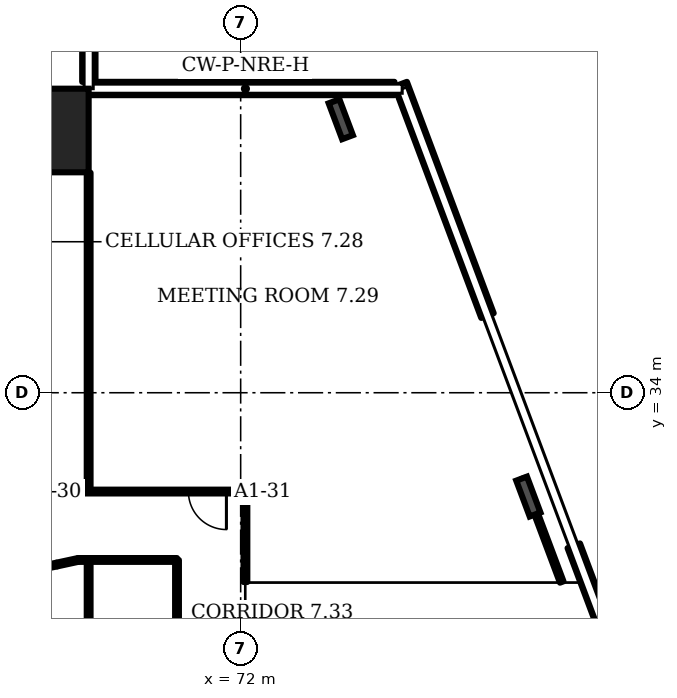
"""IFC4 building model, lengths in metres.
Left out: names, types, materials, properties, quantities, classifications, styles, units other than length and angle.
Written with IfcOpenShell. Run it as: python <this file> out.ifc"""

import sys

from ifc_helpers import new_model, si_unit, direction, frame, frame_2d, origin, origin_2d, place, context, subcontext, project, spatial, rectangle, i_section, extrude, element, fill, save


model = new_model("IFC4")
c1 = context("Model", 3, precision=1e-05, world=origin(), true_north=direction((0.0, 1.0)))
c2 = subcontext(c1, "Body", "Model", "MODEL_VIEW")
j1 = project(units=[si_unit("LENGTHUNIT", "METRE"), si_unit("PLANEANGLEUNIT", "RADIAN")], contexts=[c1])
p1 = place(None, origin())
s1 = spatial("IfcSite", under=j1, at=p1, CompositionType="ELEMENT")
p2 = place(p1, origin())
s2 = spatial("IfcBuilding", under=s1, at=p2, CompositionType="ELEMENT")
p3 = place(p2, frame((0.0, 0.0, 45.1)))
s3 = spatial("IfcBuildingStorey", under=s2, at=p3, CompositionType="ELEMENT", Elevation=45.1)
p4 = place(p3, frame((66.9, 40.9, 0.0), z_axis=(0.0, 0.0, 1.0), x_axis=(1.0, 0.0, 0.0)))
e1 = element("IfcColumn", 1, at=p4, inside=s3, PredefinedType="COLUMN", context=c2, shape_type="SweptSolid", body=[
    extrude(rectangle(XDim=2.2, YDim=2.2, at=origin_2d()), origin(), (0.0, 0.0, 1.0), 3.6),
])
for number, where, z_axis, x_axis in (
    (2, (79.57, 31.268, 0.0), (0.0, 0.0, 1.0), (0.936, 0.351, 0.0)),
    (3, (74.634, 41.196, 0.0), (0.0, 0.0, 1.0), (0.936, 0.351, 0.0)),
):
    element("IfcColumn", number, at=place(p3, frame(where, z_axis=z_axis, x_axis=x_axis)), inside=s3, PredefinedType="COLUMN", context=c2, shape_type="SweptSolid", body=[
        extrude(i_section(OverallWidth=0.302, OverallDepth=1.008, WebThickness=0.021, FlangeThickness=0.04, FilletRadius=0.03, at=origin_2d()), origin(), (0.0, 0.0, 1.0), 3.6),
    ])
p5 = place(p3, frame((82.994, 24.03, 0.0), z_axis=(0.0, 0.0, 1.0), x_axis=(-0.351133, 0.936329, 0.0)))
e4 = element("IfcWall", 4, at=p5, inside=s3, PredefinedType="SOLIDWALL", context=c2, shape_type="SweptSolid", body=[
    extrude(rectangle(XDim=6.348, YDim=0.35, at=frame_2d((3.174, 0.0))), origin(), (0.0, 0.0, 1.0), 1.0),
])
p6 = place(p3, frame((78.494, 36.03, 0.0), z_axis=(0.0, 0.0, 1.0), x_axis=(-0.351108, 0.936338, 0.0)))
e5 = element("IfcWall", 5, at=p6, inside=s3, PredefinedType="SOLIDWALL", context=c2, shape_type="SweptSolid", body=[
    extrude(rectangle(XDim=6.503, YDim=0.35, at=frame_2d((3.251, 0.0))), origin(), (0.0, 0.0, 1.0), 1.0),
])
p7 = place(p3, frame((76.047, 42.005, 0.0), z_axis=(0.0, 0.0, 1.0), x_axis=(-1.0, 0.0, 0.0)))
e6 = element("IfcWall", 6, at=p7, inside=s3, PredefinedType="SOLIDWALL", context=c2, shape_type="SweptSolid", body=[
    extrude(rectangle(XDim=8.047, YDim=0.35, at=frame_2d((4.023, 0.0))), origin(), (0.0, 0.0, 1.0), 1.0),
])
p8 = place(p3, frame((68.005, 42.18, 0.0), z_axis=(0.0, 0.0, 1.0), x_axis=(0.0, 1.0, 0.0)))
e7 = element("IfcWall", 7, at=p8, inside=s3, PredefinedType="SOLIDWALL", context=c2, shape_type="SweptSolid", body=[
    extrude(rectangle(XDim=5.947, YDim=0.35, at=frame_2d((2.973, 0.0))), origin(), (0.0, 0.0, 1.0), 1.0),
])
p9 = place(p3, frame((65.0, 31.4, 0.0), z_axis=(0.0, 0.0, 1.0), x_axis=(1.0, 0.0, 0.0)))
e8 = element("IfcWall", 8, at=p9, inside=s3, PredefinedType="PARTITIONING", context=c2, shape_type="SweptSolid", body=[
    extrude(rectangle(XDim=7.125, YDim=0.1, at=frame_2d((3.562, 0.0))), origin(), (0.0, 0.0, 1.0), 3.2),
])
p10 = place(p9, frame((0.1, 0.0, 0.0)))
e9 = element("IfcOpeningElement", 9, at=p10, cuts=e8, PredefinedType="OPENING", context=c2, shape_type="SweptSolid", body=[
    extrude(rectangle(XDim=1.0, YDim=2.1, at=frame_2d((0.5, 1.05))), frame((0.0, 0.06, 0.0), z_axis=(0.0, -1.0, 0.0), x_axis=(1.0, 0.0, 0.0)), (0.0, 0.0, 1.0), 0.12),
])
p11 = place(p9, frame((5.625, 0.0, 0.0)))
e10 = element("IfcOpeningElement", 10, at=p11, cuts=e8, PredefinedType="OPENING", context=c2, shape_type="SweptSolid", body=[
    extrude(rectangle(XDim=1.0, YDim=2.1, at=frame_2d((0.5, 1.05))), frame((0.0, 0.06, 0.0), z_axis=(0.0, -1.0, 0.0), x_axis=(1.0, 0.0, 0.0)), (0.0, 0.0, 1.0), 0.12),
])
p12 = place(p3, frame((66.78, 29.4, 0.0), z_axis=(0.0, 0.0, 1.0), x_axis=(0.979048, 0.203632, 0.0)))
e11 = element("IfcWall", 11, at=p12, inside=s3, PredefinedType="PARTITIONING", context=c2, shape_type="SweptSolid", body=[
    extrude(rectangle(XDim=0.393, YDim=0.1, at=frame_2d((0.197, 0.0))), origin(), (0.0, 0.0, 1.0), 3.2),
])
p13 = place(p3, frame((67.165, 29.48, 0.0), z_axis=(0.0, 0.0, 1.0), x_axis=(0.977367, 0.211555, 0.0)))
e12 = element("IfcWall", 12, at=p13, inside=s3, PredefinedType="PARTITIONING", context=c2, shape_type="SweptSolid", body=[
    extrude(rectangle(XDim=0.568, YDim=0.1, at=frame_2d((0.284, 0.0))), origin(), (0.0, 0.0, 1.0), 3.2),
])
p14 = place(p3, frame((67.72, 29.6, 0.0), z_axis=(0.0, 0.0, 1.0), x_axis=(1.0, 0.0, 0.0)))
e13 = element("IfcWall", 13, at=p14, inside=s3, PredefinedType="PARTITIONING", context=c2, shape_type="SweptSolid", body=[
    extrude(rectangle(XDim=2.605, YDim=0.1, at=frame_2d((1.302, 0.0))), origin(), (0.0, 0.0, 1.0), 3.2),
])
p15 = place(p3, frame((68.0, 14.24, 0.0), z_axis=(0.0, 0.0, 1.0), x_axis=(0.0, 1.0, 0.0)))
e14 = element("IfcWall", 14, at=p15, inside=s3, PredefinedType="PARTITIONING", context=c2, shape_type="SweptSolid", body=[
    extrude(rectangle(XDim=15.36, YDim=0.1, at=frame_2d((7.68, 0.0))), origin(), (0.0, 0.0, 1.0), 3.2),
])
p16 = place(p3, frame((68.0, 31.4, 0.0), z_axis=(0.0, 0.0, 1.0), x_axis=(0.0, 1.0, 0.0)))
e15 = element("IfcWall", 15, at=p16, inside=s3, PredefinedType="PARTITIONING", context=c2, shape_type="SweptSolid", body=[
    extrude(rectangle(XDim=8.39, YDim=0.1, at=frame_2d((4.195, 0.0))), origin(), (0.0, 0.0, 1.0), 3.2),
])
p17 = place(p3, frame((70.325, 24.6, 0.0), z_axis=(0.0, 0.0, 1.0), x_axis=(0.0, 1.0, 0.0)))
e16 = element("IfcWall", 16, at=p17, inside=s3, PredefinedType="PARTITIONING", context=c2, shape_type="SweptSolid", body=[
    extrude(rectangle(XDim=5.0, YDim=0.1, at=frame_2d((2.5, 0.0))), origin(), (0.0, 0.0, 1.0), 3.2),
])
p18 = place(p3, frame((72.125, 29.02, 0.0), z_axis=(0.0, 0.0, 1.0), x_axis=(0.0, 1.0, 0.0)))
e17 = element("IfcWall", 17, at=p18, inside=s3, PredefinedType="PARTITIONING", context=c2, shape_type="SweptSolid", body=[
    extrude(rectangle(XDim=2.38, YDim=0.1, at=frame_2d((1.19, 0.0))), origin(), (0.0, 0.0, 1.0), 3.2),
])
p19 = place(p3, frame((80.448, 29.02, 0.0), z_axis=(0.0, 0.0, 1.0), x_axis=(-0.35129, 0.93627, 0.0)))
e18 = element("IfcWall", 18, at=p19, inside=s3, PredefinedType="PARTITIONING", context=c2, shape_type="SweptSolid", body=[
    extrude(rectangle(XDim=2.911, YDim=0.1, at=frame_2d((1.455, 0.0))), origin(), (0.0, 0.0, 1.0), 2.58),
])
p20 = place(p11, origin())
e19 = element("IfcDoor", 19, at=p20, inside=s3, OperationType="SINGLE_SWING_RIGHT", PredefinedType="DOOR", context=c2, shape_type="SweptSolid", body=[
    extrude(rectangle(XDim=1.0, YDim=2.1, at=frame_2d((0.5, 1.05))), frame((0.0, 0.025, 0.0), z_axis=(0.0, -1.0, 0.0), x_axis=(1.0, 0.0, 0.0)), (0.0, 0.0, 1.0), 0.05),
])
fill(e10, e19)
save(model, sys.argv[1])
